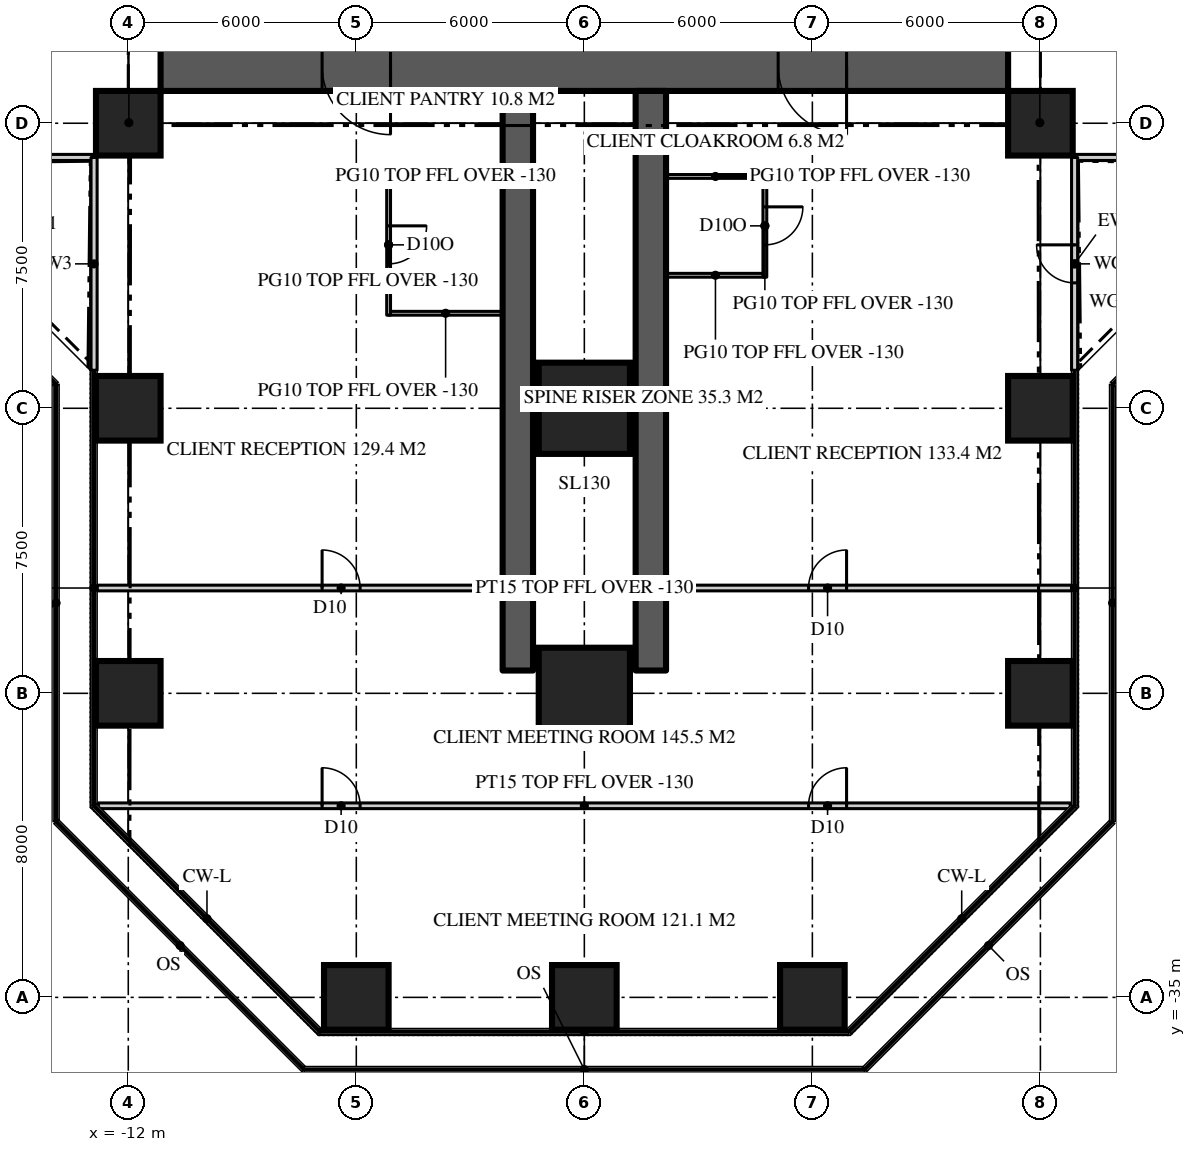
"""IFC4 building model, lengths in metres.
Left out: names, types, materials, properties, quantities, classifications, styles, units other than length and angle.
Written with IfcOpenShell. Run it as: python <this file> out.ifc"""

import sys

from ifc_helpers import new_model, si_unit, direction, frame, frame_2d, origin, origin_2d, place, context, subcontext, project, spatial, rectangle, extrude, element, fill, save


model = new_model("IFC4")
c1 = context("Model", 3, precision=1e-05, world=origin(), true_north=direction((0.0, 1.0)))
c2 = subcontext(c1, "Body", "Model", "MODEL_VIEW")
j1 = project(units=[si_unit("LENGTHUNIT", "METRE"), si_unit("PLANEANGLEUNIT", "RADIAN")], contexts=[c1])
p1 = place(None, origin())
s1 = spatial("IfcSite", under=j1, at=p1, CompositionType="ELEMENT")
p2 = place(p1, origin())
s2 = spatial("IfcBuilding", under=s1, at=p2, CompositionType="ELEMENT")
p3 = place(p2, frame((0.0, 0.0, 90.3)))
s3 = spatial("IfcBuildingStorey", under=s2, at=p3, CompositionType="ELEMENT", Elevation=90.3)
p4 = place(p3, frame((11.15, -10.5, 0.0), z_axis=(0.0, 0.0, 1.0), x_axis=(-1.0, 0.0, 0.0)))
e1 = element("IfcWall", 1, at=p4, inside=s3, PredefinedType="SHEAR", context=c2, shape_type="SweptSolid", body=[
    extrude(rectangle(XDim=22.3, YDim=1.3, at=frame_2d((11.15, 0.0))), origin(), (0.0, 0.0, 1.0), 3.9),
])
p5 = place(p4, frame((16.25, 0.0, 0.0)))
e2 = element("IfcOpeningElement", 2, at=p5, cuts=e1, PredefinedType="OPENING", context=c2, shape_type="SweptSolid", body=[
    extrude(rectangle(XDim=1.8, YDim=2.2, at=frame_2d((0.9, 1.1))), frame((0.0, 0.66, 0.0), z_axis=(0.0, -1.0, 0.0), x_axis=(1.0, 0.0, 0.0)), (0.0, 0.0, 1.0), 1.32),
])
p6 = place(p4, frame((4.25, 0.0, 0.0)))
e3 = element("IfcOpeningElement", 3, at=p6, cuts=e1, PredefinedType="OPENING", context=c2, shape_type="SweptSolid", body=[
    extrude(rectangle(XDim=1.8, YDim=2.2, at=frame_2d((0.9, 1.1))), frame((0.0, 0.66, 0.0), z_axis=(0.0, -1.0, 0.0), x_axis=(1.0, 0.0, 0.0)), (0.0, 0.0, 1.0), 1.32),
])
for number, where, z_axis, x_axis in (
    (4, (-1.75, -11.15, 0.0), (0.0, 0.0, 1.0), (0.0, -1.0, 0.0)),
    (5, (1.75, -11.15, 0.0), (0.0, 0.0, 1.0), (0.0, -1.0, 0.0)),
):
    element("IfcWall", number, at=place(p3, frame(where, z_axis=z_axis, x_axis=x_axis)), inside=s3, PredefinedType="SHEAR", context=c2, shape_type="SweptSolid", body=[
        extrude(rectangle(XDim=15.25, YDim=0.8, at=frame_2d((7.625, 0.0))), origin(), (0.0, 0.0, 1.0), 3.9),
    ])
for number, where, z_axis, x_axis in (
    (6, (-6.0, -35.0, 0.0), (0.0, 0.0, 1.0), (1.0, 0.0, 0.0)),
    (7, (0.0, -35.0, 0.0), (0.0, 0.0, 1.0), (1.0, 0.0, 0.0)),
    (8, (6.0, -35.0, 0.0), (0.0, 0.0, 1.0), (1.0, 0.0, 0.0)),
    (9, (-12.0, -27.0, 0.0), (0.0, 0.0, 1.0), (1.0, 0.0, 0.0)),
):
    element("IfcColumn", number, at=place(p3, frame(where, z_axis=z_axis, x_axis=x_axis)), inside=s3, PredefinedType="COLUMN", context=c2, shape_type="SweptSolid", body=[
        extrude(rectangle(XDim=1.7, YDim=1.7, at=origin_2d()), origin(), (0.0, 0.0, 1.0), 3.9),
    ])
p7 = place(p3, frame((0.0, -27.0, 0.0), z_axis=(0.0, 0.0, 1.0), x_axis=(1.0, 0.0, 0.0)))
e10 = element("IfcColumn", 10, at=p7, inside=s3, PredefinedType="COLUMN", context=c2, shape_type="SweptSolid", body=[
    extrude(rectangle(XDim=2.4, YDim=2.4, at=origin_2d()), origin(), (0.0, 0.0, 1.0), 3.9),
])
for number, where, z_axis, x_axis in (
    (11, (12.0, -27.0, 0.0), (0.0, 0.0, 1.0), (1.0, 0.0, 0.0)),
    (12, (-12.0, -19.5, 0.0), (0.0, 0.0, 1.0), (1.0, 0.0, 0.0)),
):
    element("IfcColumn", number, at=place(p3, frame(where, z_axis=z_axis, x_axis=x_axis)), inside=s3, PredefinedType="COLUMN", context=c2, shape_type="SweptSolid", body=[
        extrude(rectangle(XDim=1.7, YDim=1.7, at=origin_2d()), origin(), (0.0, 0.0, 1.0), 3.9),
    ])
p8 = place(p3, frame((0.0, -19.5, 0.0), z_axis=(0.0, 0.0, 1.0), x_axis=(1.0, 0.0, 0.0)))
e13 = element("IfcColumn", 13, at=p8, inside=s3, PredefinedType="COLUMN", context=c2, shape_type="SweptSolid", body=[
    extrude(rectangle(XDim=2.4, YDim=2.4, at=origin_2d()), origin(), (0.0, 0.0, 1.0), 3.9),
])
for number, where, z_axis, x_axis in (
    (14, (12.0, -19.5, 0.0), (0.0, 0.0, 1.0), (1.0, 0.0, 0.0)),
    (15, (-12.0, -12.0, 0.0), (0.0, 0.0, 1.0), (1.0, 0.0, 0.0)),
    (16, (12.0, -12.0, 0.0), (0.0, 0.0, 1.0), (1.0, 0.0, 0.0)),
):
    element("IfcColumn", number, at=place(p3, frame(where, z_axis=z_axis, x_axis=x_axis)), inside=s3, PredefinedType="COLUMN", context=c2, shape_type="SweptSolid", body=[
        extrude(rectangle(XDim=1.7, YDim=1.7, at=origin_2d()), origin(), (0.0, 0.0, 1.0), 3.9),
    ])
p9 = place(p3, frame((12.9, -12.9, 0.0), z_axis=(0.0, 0.0, 1.0), x_axis=(1.0, 0.0, 0.0)))
e17 = element("IfcWall", 17, at=p9, inside=s3, PredefinedType="SOLIDWALL", context=c2, shape_type="SweptSolid", body=[
    extrude(rectangle(XDim=5.6, YDim=0.16, at=frame_2d((2.8, 0.0))), origin(), (0.0, 0.0, 1.0), 3.77),
])
p10 = place(p3, frame((-18.5, -12.9, 0.0), z_axis=(0.0, 0.0, 1.0), x_axis=(1.0, 0.0, 0.0)))
e18 = element("IfcWall", 18, at=p10, inside=s3, PredefinedType="SOLIDWALL", context=c2, shape_type="SweptSolid", body=[
    extrude(rectangle(XDim=5.6, YDim=0.16, at=frame_2d((2.8, 0.0))), origin(), (0.0, 0.0, 1.0), 3.77),
])
p11 = place(p10, frame((2.3, 0.0, 0.0)))
e19 = element("IfcOpeningElement", 19, at=p11, cuts=e18, PredefinedType="OPENING", context=c2, shape_type="SweptSolid", body=[
    extrude(rectangle(XDim=1.0, YDim=2.2, at=frame_2d((0.5, 1.1))), frame((0.0, 0.09, 0.0), z_axis=(0.0, -1.0, 0.0), x_axis=(1.0, 0.0, 0.0)), (0.0, 0.0, 1.0), 0.18),
])
p12 = place(p3, frame((-12.9, -12.9, 0.0), z_axis=(0.0, 0.0, 1.0), x_axis=(0.0, -1.0, 0.0)))
e20 = element("IfcWall", 20, at=p12, inside=s3, PredefinedType="SOLIDWALL", context=c2, shape_type="SweptSolid", body=[
    extrude(rectangle(XDim=5.6, YDim=0.16, at=frame_2d((2.8, 0.0))), origin(), (0.0, 0.0, 1.0), 3.77),
])
p13 = place(p3, frame((12.9, -18.5, 0.0), z_axis=(0.0, 0.0, 1.0), x_axis=(0.0, 1.0, 0.0)))
e21 = element("IfcWall", 21, at=p13, inside=s3, PredefinedType="SOLIDWALL", context=c2, shape_type="SweptSolid", body=[
    extrude(rectangle(XDim=5.6, YDim=0.16, at=frame_2d((2.8, 0.0))), origin(), (0.0, 0.0, 1.0), 3.77),
])
p14 = place(p13, frame((2.3, 0.0, 0.0)))
e22 = element("IfcOpeningElement", 22, at=p14, cuts=e21, PredefinedType="OPENING", context=c2, shape_type="SweptSolid", body=[
    extrude(rectangle(XDim=1.0, YDim=2.2, at=frame_2d((0.5, 1.1))), frame((0.0, 0.09, 0.0), z_axis=(0.0, -1.0, 0.0), x_axis=(1.0, 0.0, 0.0)), (0.0, 0.0, 1.0), 0.18),
])
p15 = place(p3, frame((-12.82, -24.229, 0.0), z_axis=(0.0, 0.0, 1.0), x_axis=(1.0, 0.0, 0.0)))
e23 = element("IfcWall", 23, at=p15, inside=s3, PredefinedType="PARTITIONING", context=c2, shape_type="SweptSolid", body=[
    extrude(rectangle(XDim=25.64, YDim=0.15, at=frame_2d((12.82, 0.0))), origin(), (0.0, 0.0, 1.0), 3.77),
])
p16 = place(p15, frame((18.72, 0.0, 0.0)))
e24 = element("IfcOpeningElement", 24, at=p16, cuts=e23, PredefinedType="OPENING", context=c2, shape_type="SweptSolid", body=[
    extrude(rectangle(XDim=1.0, YDim=2.2, at=frame_2d((0.5, 1.1))), frame((0.0, 0.085, 0.0), z_axis=(0.0, -1.0, 0.0), x_axis=(1.0, 0.0, 0.0)), (0.0, 0.0, 1.0), 0.17),
])
p17 = place(p15, frame((5.92, 0.0, 0.0)))
e25 = element("IfcOpeningElement", 25, at=p17, cuts=e23, PredefinedType="OPENING", context=c2, shape_type="SweptSolid", body=[
    extrude(rectangle(XDim=1.0, YDim=2.2, at=frame_2d((0.5, 1.1))), frame((0.0, 0.085, 0.0), z_axis=(0.0, -1.0, 0.0), x_axis=(1.0, 0.0, 0.0)), (0.0, 0.0, 1.0), 0.17),
])
p18 = place(p3, frame((-12.786, -29.959, 0.0), z_axis=(0.0, 0.0, 1.0), x_axis=(1.0, 0.0, 0.0)))
e26 = element("IfcWall", 26, at=p18, inside=s3, PredefinedType="PARTITIONING", context=c2, shape_type="SweptSolid", body=[
    extrude(rectangle(XDim=25.573, YDim=0.15, at=frame_2d((12.786, 0.0))), origin(), (0.0, 0.0, 1.0), 3.77),
])
p19 = place(p18, frame((18.687, 0.0, 0.0)))
e27 = element("IfcOpeningElement", 27, at=p19, cuts=e26, PredefinedType="OPENING", context=c2, shape_type="SweptSolid", body=[
    extrude(rectangle(XDim=1.0, YDim=2.2, at=frame_2d((0.5, 1.1))), frame((0.0, 0.085, 0.0), z_axis=(0.0, -1.0, 0.0), x_axis=(1.0, 0.0, 0.0)), (0.0, 0.0, 1.0), 0.17),
])
p20 = place(p18, frame((5.886, 0.0, 0.0)))
e28 = element("IfcOpeningElement", 28, at=p20, cuts=e26, PredefinedType="OPENING", context=c2, shape_type="SweptSolid", body=[
    extrude(rectangle(XDim=1.0, YDim=2.2, at=frame_2d((0.5, 1.1))), frame((0.0, 0.085, 0.0), z_axis=(0.0, -1.0, 0.0), x_axis=(1.0, 0.0, 0.0)), (0.0, 0.0, 1.0), 0.17),
])
for number, where, z_axis, x_axis in (
    (29, (2.15, -13.4, 0.0), (0.0, 0.0, 1.0), (1.0, 0.0, 0.0)),
    (30, (2.15, -16.0, 0.0), (0.0, 0.0, 1.0), (1.0, 0.0, 0.0)),
):
    element("IfcWall", number, at=place(p3, frame(where, z_axis=z_axis, x_axis=x_axis)), inside=s3, PredefinedType="PARTITIONING", context=c2, shape_type="SweptSolid", body=[
        extrude(rectangle(XDim=2.6, YDim=0.1, at=frame_2d((1.3, 0.0))), origin(), (0.0, 0.0, 1.0), 3.77),
    ])
p21 = place(p3, frame((4.75, -13.35, 0.0), z_axis=(0.0, 0.0, 1.0), x_axis=(0.0, -1.0, 0.0)))
e31 = element("IfcWall", 31, at=p21, inside=s3, PredefinedType="PARTITIONING", context=c2, shape_type="SweptSolid", body=[
    extrude(rectangle(XDim=2.7, YDim=0.1, at=frame_2d((1.35, 0.0))), origin(), (0.0, 0.0, 1.0), 3.77),
])
p22 = place(p21, frame((0.85, 0.0, 0.0)))
e32 = element("IfcOpeningElement", 32, at=p22, cuts=e31, PredefinedType="OPENING", context=c2, shape_type="SweptSolid", body=[
    extrude(rectangle(XDim=1.0, YDim=2.2, at=frame_2d((0.5, 1.1))), frame((0.0, 0.06, 0.0), z_axis=(0.0, -1.0, 0.0), x_axis=(1.0, 0.0, 0.0)), (0.0, 0.0, 1.0), 0.12),
])
for number, where, z_axis, x_axis in (
    (33, (-2.15, -13.4, 0.0), (0.0, 0.0, 1.0), (-1.0, 0.0, 0.0)),
    (34, (-2.15, -17.0, 0.0), (0.0, 0.0, 1.0), (-1.0, 0.0, 0.0)),
):
    element("IfcWall", number, at=place(p3, frame(where, z_axis=z_axis, x_axis=x_axis)), inside=s3, PredefinedType="PARTITIONING", context=c2, shape_type="SweptSolid", body=[
        extrude(rectangle(XDim=3.0, YDim=0.1, at=frame_2d((1.5, 0.0))), origin(), (0.0, 0.0, 1.0), 3.77),
    ])
p23 = place(p3, frame((-5.15, -13.35, 0.0), z_axis=(0.0, 0.0, 1.0), x_axis=(0.0, -1.0, 0.0)))
e35 = element("IfcWall", 35, at=p23, inside=s3, PredefinedType="PARTITIONING", context=c2, shape_type="SweptSolid", body=[
    extrude(rectangle(XDim=3.7, YDim=0.1, at=frame_2d((1.85, 0.0))), origin(), (0.0, 0.0, 1.0), 3.77),
])
p24 = place(p23, frame((1.35, 0.0, 0.0)))
e36 = element("IfcOpeningElement", 36, at=p24, cuts=e35, PredefinedType="OPENING", context=c2, shape_type="SweptSolid", body=[
    extrude(rectangle(XDim=1.0, YDim=2.2, at=frame_2d((0.5, 1.1))), frame((0.0, 0.06, 0.0), z_axis=(0.0, -1.0, 0.0), x_axis=(1.0, 0.0, 0.0)), (0.0, 0.0, 1.0), 0.12),
])
for number, where, z_axis, x_axis in (
    (37, (-11.15, -11.15, 0.0), (0.0, 0.0, 1.0), (-0.707, -0.707, 0.0)),
    (38, (11.15, -11.15, 0.0), (0.0, 0.0, 1.0), (0.707, -0.707, 0.0)),
):
    element("IfcWall", number, at=place(p3, frame(where, z_axis=z_axis, x_axis=x_axis)), inside=s3, PredefinedType="PARTITIONING", context=c2, shape_type="SweptSolid", body=[
        extrude(rectangle(XDim=2.362, YDim=0.15, at=frame_2d((1.181, 0.0))), origin(), (0.0, 0.0, 1.0), 3.22),
    ])
p25 = place(p14, origin())
e39 = element("IfcDoor", 39, at=p25, inside=s3, OperationType="SINGLE_SWING_RIGHT", PredefinedType="DOOR", context=c2, shape_type="SweptSolid", body=[
    extrude(rectangle(XDim=1.0, YDim=2.2, at=frame_2d((0.5, 1.1))), frame((0.0, 0.025, 0.0), z_axis=(0.0, -1.0, 0.0), x_axis=(1.0, 0.0, 0.0)), (0.0, 0.0, 1.0), 0.05),
])
fill(e22, e39)
p26 = place(p5, origin())
e40 = element("IfcDoor", 40, at=p26, inside=s3, OperationType="DOUBLE_DOOR_DOUBLE_SWING", PredefinedType="DOOR", context=c2, shape_type="SweptSolid", body=[
    extrude(rectangle(XDim=1.8, YDim=2.2, at=frame_2d((0.9, 1.1))), frame((0.0, 0.025, 0.0), z_axis=(0.0, -1.0, 0.0), x_axis=(1.0, 0.0, 0.0)), (0.0, 0.0, 1.0), 0.05),
])
fill(e2, e40)
p27 = place(p6, origin())
e41 = element("IfcDoor", 41, at=p27, inside=s3, OperationType="DOUBLE_DOOR_DOUBLE_SWING", PredefinedType="DOOR", context=c2, shape_type="SweptSolid", body=[
    extrude(rectangle(XDim=1.8, YDim=2.2, at=frame_2d((0.9, 1.1))), frame((0.0, 0.025, 0.0), z_axis=(0.0, -1.0, 0.0), x_axis=(1.0, 0.0, 0.0)), (0.0, 0.0, 1.0), 0.05),
])
fill(e3, e41)
p28 = place(p16, origin())
e42 = element("IfcDoor", 42, at=p28, inside=s3, OperationType="SINGLE_SWING_RIGHT", PredefinedType="DOOR", context=c2, shape_type="SweptSolid", body=[
    extrude(rectangle(XDim=1.0, YDim=2.2, at=frame_2d((0.5, 1.1))), frame((0.0, 0.025, 0.0), z_axis=(0.0, -1.0, 0.0), x_axis=(1.0, 0.0, 0.0)), (0.0, 0.0, 1.0), 0.05),
])
fill(e24, e42)
p29 = place(p17, origin())
e43 = element("IfcDoor", 43, at=p29, inside=s3, OperationType="SINGLE_SWING_LEFT", PredefinedType="DOOR", context=c2, shape_type="SweptSolid", body=[
    extrude(rectangle(XDim=1.0, YDim=2.2, at=frame_2d((0.5, 1.1))), frame((0.0, 0.025, 0.0), z_axis=(0.0, -1.0, 0.0), x_axis=(1.0, 0.0, 0.0)), (0.0, 0.0, 1.0), 0.05),
])
fill(e25, e43)
p30 = place(p19, origin())
e44 = element("IfcDoor", 44, at=p30, inside=s3, OperationType="SINGLE_SWING_RIGHT", PredefinedType="DOOR", context=c2, shape_type="SweptSolid", body=[
    extrude(rectangle(XDim=1.0, YDim=2.2, at=frame_2d((0.5, 1.1))), frame((0.0, 0.025, 0.0), z_axis=(0.0, -1.0, 0.0), x_axis=(1.0, 0.0, 0.0)), (0.0, 0.0, 1.0), 0.05),
])
fill(e27, e44)
p31 = place(p20, origin())
e45 = element("IfcDoor", 45, at=p31, inside=s3, OperationType="SINGLE_SWING_LEFT", PredefinedType="DOOR", context=c2, shape_type="SweptSolid", body=[
    extrude(rectangle(XDim=1.0, YDim=2.2, at=frame_2d((0.5, 1.1))), frame((0.0, 0.025, 0.0), z_axis=(0.0, -1.0, 0.0), x_axis=(1.0, 0.0, 0.0)), (0.0, 0.0, 1.0), 0.05),
])
fill(e28, e45)
p32 = place(p22, origin())
e46 = element("IfcDoor", 46, at=p32, inside=s3, OperationType="SINGLE_SWING_LEFT", PredefinedType="DOOR", context=c2, shape_type="SweptSolid", body=[
    extrude(rectangle(XDim=1.0, YDim=2.2, at=frame_2d((0.5, 1.1))), frame((0.0, 0.025, 0.0), z_axis=(0.0, -1.0, 0.0), x_axis=(1.0, 0.0, 0.0)), (0.0, 0.0, 1.0), 0.05),
])
fill(e32, e46)
p33 = place(p24, origin())
e47 = element("IfcDoor", 47, at=p33, inside=s3, OperationType="SINGLE_SWING_LEFT", PredefinedType="DOOR", context=c2, shape_type="SweptSolid", body=[
    extrude(rectangle(XDim=1.0, YDim=2.2, at=frame_2d((0.5, 1.1))), frame((0.0, 0.025, 0.0), z_axis=(0.0, -1.0, 0.0), x_axis=(1.0, 0.0, 0.0)), (0.0, 0.0, 1.0), 0.05),
])
fill(e36, e47)
save(model, sys.argv[1])
